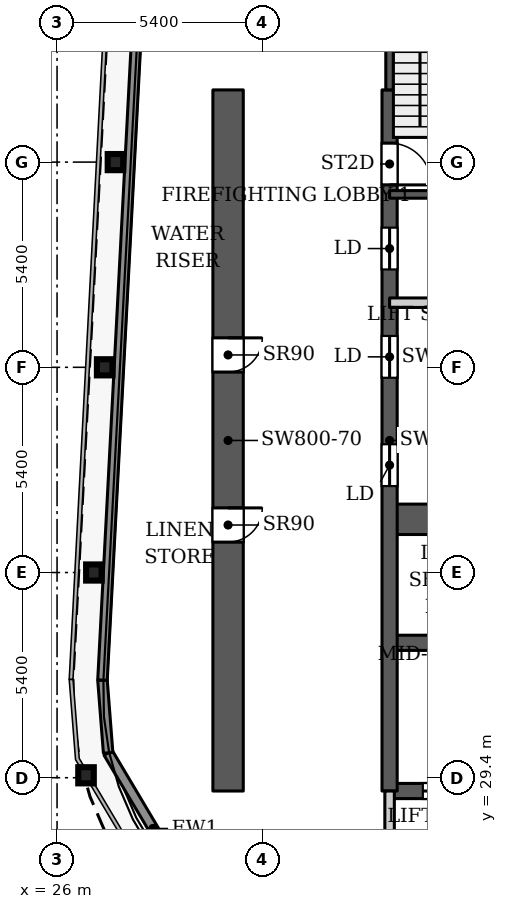
"""IFC4 building model, lengths in metres.
Left out: names, types, materials, properties, quantities, classifications, styles, units other than length and angle.
Written with IfcOpenShell. Run it as: python <this file> out.ifc"""

import sys

from ifc_helpers import new_model, si_unit, direction, frame, frame_2d, origin, origin_2d, place, context, subcontext, project, spatial, rectangle, i_section, extrude, source, transform, mapped, element, fill, save


model = new_model("IFC4")
c1 = context("Model", 3, precision=1e-05, world=origin(), true_north=direction((0.0, 1.0)))
c2 = subcontext(c1, "Body", "Model", "MODEL_VIEW")
j1 = project(units=[si_unit("LENGTHUNIT", "METRE"), si_unit("PLANEANGLEUNIT", "RADIAN")], contexts=[c1])
p1 = place(None, origin())
s1 = spatial("IfcSite", under=j1, at=p1, CompositionType="ELEMENT")
p2 = place(p1, origin())
s2 = spatial("IfcBuilding", under=s1, at=p2, CompositionType="ELEMENT")
p3 = place(p2, frame((0.0, 0.0, 156.5)))
s3 = spatial("IfcBuildingStorey", under=s2, at=p3, CompositionType="ELEMENT", Elevation=156.5)
for number, where, z_axis, x_axis in (
    (1, (26.762, 29.464, 0.0), (0.0, 0.0, 1.0), (1.0, 0.0, 0.0)),
    (2, (26.969, 34.8, 0.0), (0.0, 0.0, 1.0), (1.0, 0.0, 0.0)),
    (3, (27.253, 40.2, 0.0), (0.0, 0.0, 1.0), (1.0, 0.0, 0.0)),
    (4, (27.537, 45.6, 0.0), (0.0, 0.0, 1.0), (1.0, 0.0, 0.0)),
):
    element("IfcColumn", number, at=place(p3, frame(where, z_axis=z_axis, x_axis=x_axis)), inside=s3, PredefinedType="COLUMN", context=c2, shape_type="SweptSolid", body=[
        extrude(i_section(OverallWidth=0.409, OverallDepth=0.425, WebThickness=0.033, FlangeThickness=0.052, FilletRadius=0.013, at=origin_2d()), origin(), (0.0, 0.0, 1.0), 3.9),
    ])
p4 = place(p3, frame((34.75, 29.05, 0.0), z_axis=(0.0, 0.0, 1.0), x_axis=(1.0, 0.0, 0.0)))
e5 = element("IfcWall", 5, at=p4, inside=s3, PredefinedType="SHEAR", context=c2, shape_type="SweptSolid", body=[
    extrude(rectangle(XDim=18.4, YDim=0.4, at=frame_2d((9.2, 0.0))), origin(), (0.0, 0.0, 1.0), 3.9),
])
p5 = place(p4, frame((0.875, 0.0, 0.0)))
e6 = element("IfcOpeningElement", 6, at=p5, cuts=e5, PredefinedType="OPENING", context=c2, shape_type="SweptSolid", body=[
    extrude(rectangle(XDim=1.1, YDim=2.2, at=frame_2d((0.55, 1.1))), frame((0.0, 0.21, 0.0), z_axis=(0.0, -1.0, 0.0), x_axis=(1.0, 0.0, 0.0)), (0.0, 0.0, 1.0), 0.42),
])
p6 = place(p4, frame((3.725, 0.0, 0.0)))
e7 = element("IfcOpeningElement", 7, at=p6, cuts=e5, PredefinedType="OPENING", context=c2, shape_type="SweptSolid", body=[
    extrude(rectangle(XDim=1.1, YDim=2.2, at=frame_2d((0.55, 1.1))), frame((0.0, 0.21, 0.0), z_axis=(0.0, -1.0, 0.0), x_axis=(1.0, 0.0, 0.0)), (0.0, 0.0, 1.0), 0.42),
])
p7 = place(p4, frame((6.575, 0.0, 0.0)))
e8 = element("IfcOpeningElement", 8, at=p7, cuts=e5, PredefinedType="OPENING", context=c2, shape_type="SweptSolid", body=[
    extrude(rectangle(XDim=1.1, YDim=2.2, at=frame_2d((0.55, 1.1))), frame((0.0, 0.21, 0.0), z_axis=(0.0, -1.0, 0.0), x_axis=(1.0, 0.0, 0.0)), (0.0, 0.0, 1.0), 0.42),
])
p8 = place(p4, frame((9.425, 0.0, 0.0)))
e9 = element("IfcOpeningElement", 9, at=p8, cuts=e5, PredefinedType="OPENING", context=c2, shape_type="SweptSolid", body=[
    extrude(rectangle(XDim=1.1, YDim=2.2, at=frame_2d((0.55, 1.1))), frame((0.0, 0.21, 0.0), z_axis=(0.0, -1.0, 0.0), x_axis=(1.0, 0.0, 0.0)), (0.0, 0.0, 1.0), 0.42),
])
p9 = place(p4, frame((12.275, 0.0, 0.0)))
e10 = element("IfcOpeningElement", 10, at=p9, cuts=e5, PredefinedType="OPENING", context=c2, shape_type="SweptSolid", body=[
    extrude(rectangle(XDim=1.1, YDim=2.2, at=frame_2d((0.55, 1.1))), frame((0.0, 0.21, 0.0), z_axis=(0.0, -1.0, 0.0), x_axis=(1.0, 0.0, 0.0)), (0.0, 0.0, 1.0), 0.42),
])
p10 = place(p4, frame((15.125, 0.0, 0.0)))
e11 = element("IfcOpeningElement", 11, at=p10, cuts=e5, PredefinedType="OPENING", context=c2, shape_type="SweptSolid", body=[
    extrude(rectangle(XDim=1.1, YDim=2.2, at=frame_2d((0.55, 1.1))), frame((0.0, 0.21, 0.0), z_axis=(0.0, -1.0, 0.0), x_axis=(1.0, 0.0, 0.0)), (0.0, 0.0, 1.0), 0.42),
])
p11 = place(p3, frame((34.75, 32.95, 0.0), z_axis=(0.0, 0.0, 1.0), x_axis=(1.0, 0.0, 0.0)))
e12 = element("IfcWall", 12, at=p11, inside=s3, PredefinedType="SHEAR", context=c2, shape_type="SweptSolid", body=[
    extrude(rectangle(XDim=14.25, YDim=0.4, at=frame_2d((7.125, 0.0))), origin(), (0.0, 0.0, 1.0), 3.9),
])
p12 = place(p3, frame((34.75, 36.2, 0.0), z_axis=(0.0, 0.0, 1.0), x_axis=(1.0, 0.0, 0.0)))
e13 = element("IfcWall", 13, at=p12, inside=s3, PredefinedType="SHEAR", context=c2, shape_type="SweptSolid", body=[
    extrude(rectangle(XDim=18.4, YDim=0.8, at=frame_2d((9.2, 0.0))), origin(), (0.0, 0.0, 1.0), 3.9),
])
p13 = place(p12, frame((16.9, 0.0, 0.0)))
e14 = element("IfcOpeningElement", 14, at=p13, cuts=e13, PredefinedType="OPENING", context=c2, shape_type="SweptSolid", body=[
    extrude(rectangle(XDim=1.0, YDim=2.2, at=frame_2d((0.5, 1.1))), frame((0.0, 0.41, 0.0), z_axis=(0.0, -1.0, 0.0), x_axis=(1.0, 0.0, 0.0)), (0.0, 0.0, 1.0), 0.82),
])
p14 = place(p3, frame((34.75, 29.05, 0.0), z_axis=(0.0, 0.0, 1.0), x_axis=(0.0, 1.0, 0.0)))
e15 = element("IfcWall", 15, at=p14, inside=s3, PredefinedType="SHEAR", context=c2, shape_type="SweptSolid", body=[
    extrude(rectangle(XDim=18.45, YDim=0.4, at=frame_2d((9.225, 0.0))), origin(), (0.0, 0.0, 1.0), 3.9),
])
p15 = place(p14, frame((8.025, 0.0, 0.0)))
e16 = element("IfcOpeningElement", 16, at=p15, cuts=e15, PredefinedType="OPENING", context=c2, shape_type="SweptSolid", body=[
    extrude(rectangle(XDim=1.1, YDim=2.2, at=frame_2d((0.55, 1.1))), frame((0.0, 0.21, 0.0), z_axis=(0.0, -1.0, 0.0), x_axis=(1.0, 0.0, 0.0)), (0.0, 0.0, 1.0), 0.42),
])
p16 = place(p14, frame((10.875, 0.0, 0.0)))
e17 = element("IfcOpeningElement", 17, at=p16, cuts=e15, PredefinedType="OPENING", context=c2, shape_type="SweptSolid", body=[
    extrude(rectangle(XDim=1.1, YDim=2.2, at=frame_2d((0.55, 1.1))), frame((0.0, 0.21, 0.0), z_axis=(0.0, -1.0, 0.0), x_axis=(1.0, 0.0, 0.0)), (0.0, 0.0, 1.0), 0.42),
])
p17 = place(p14, frame((13.725, 0.0, 0.0)))
e18 = element("IfcOpeningElement", 18, at=p17, cuts=e15, PredefinedType="OPENING", context=c2, shape_type="SweptSolid", body=[
    extrude(rectangle(XDim=1.1, YDim=2.2, at=frame_2d((0.55, 1.1))), frame((0.0, 0.21, 0.0), z_axis=(0.0, -1.0, 0.0), x_axis=(1.0, 0.0, 0.0)), (0.0, 0.0, 1.0), 0.42),
])
p18 = place(p14, frame((15.95, 0.0, 0.0)))
e19 = element("IfcOpeningElement", 19, at=p18, cuts=e15, PredefinedType="OPENING", context=c2, shape_type="SweptSolid", body=[
    extrude(rectangle(XDim=1.1, YDim=2.2, at=frame_2d((0.55, 1.1))), frame((0.0, 0.21, 0.0), z_axis=(0.0, -1.0, 0.0), x_axis=(1.0, 0.0, 0.0)), (0.0, 0.0, 1.0), 0.42),
])
p19 = place(p3, frame((30.5, 29.05, 0.0), z_axis=(0.0, 0.0, 1.0), x_axis=(0.0, 1.0, 0.0)))
e20 = element("IfcWall", 20, at=p19, inside=s3, PredefinedType="SHEAR", context=c2, shape_type="SweptSolid", body=[
    extrude(rectangle(XDim=18.45, YDim=0.8, at=frame_2d((9.225, 0.0))), origin(), (0.0, 0.0, 1.0), 3.9),
])
p20 = place(p19, frame((6.55, 0.0, 0.0)))
e21 = element("IfcOpeningElement", 21, at=p20, cuts=e20, PredefinedType="OPENING", context=c2, shape_type="SweptSolid", body=[
    extrude(rectangle(XDim=0.9, YDim=2.2, at=frame_2d((0.45, 1.1))), frame((0.0, 0.41, 0.0), z_axis=(0.0, -1.0, 0.0), x_axis=(1.0, 0.0, 0.0)), (0.0, 0.0, 1.0), 0.82),
])
p21 = place(p19, frame((11.025, 0.0, 0.0)))
e22 = element("IfcOpeningElement", 22, at=p21, cuts=e20, PredefinedType="OPENING", context=c2, shape_type="SweptSolid", body=[
    extrude(rectangle(XDim=0.9, YDim=2.2, at=frame_2d((0.45, 1.1))), frame((0.0, 0.41, 0.0), z_axis=(0.0, -1.0, 0.0), x_axis=(1.0, 0.0, 0.0)), (0.0, 0.0, 1.0), 0.82),
])
p22 = place(p3, frame((29.712, 26.072, 0.0), z_axis=(0.0, 0.0, 1.0), x_axis=(-0.511028049012, 0.859564036662, 0.0)))
e23 = element("IfcWall", 23, at=p22, inside=s3, PredefinedType="SOLIDWALL", context=c2, shape_type="SweptSolid", body=[
    extrude(rectangle(XDim=4.634, YDim=0.25, at=frame_2d((2.317, 0.0))), origin(), (0.0, 0.0, 1.0), 3.147),
])
p23 = place(p3, frame((27.344, 30.055, 0.0), z_axis=(0.0, 0.0, 1.0), x_axis=(-0.077571675317, 0.99698677784, 0.0)))
e24 = element("IfcWall", 24, at=p23, inside=s3, PredefinedType="SOLIDWALL", context=c2, shape_type="SweptSolid", body=[
    extrude(rectangle(XDim=1.92, YDim=0.25, at=frame_2d((0.96, 0.0))), origin(), (0.0, 0.0, 1.0), 3.75),
])
p24 = place(p3, frame((27.195, 31.969, 0.0), z_axis=(0.0, 0.0, 1.0), x_axis=(0.052554995867, 0.998618031286, 0.0)))
e25 = element("IfcWall", 25, at=p24, inside=s3, PredefinedType="SOLIDWALL", context=c2, shape_type="SweptSolid", body=[
    extrude(rectangle(XDim=66.787, YDim=0.25, at=frame_2d((33.394, 0.0))), origin(), (0.0, 0.0, 1.0), 3.75),
])
p25 = place(p3, frame((34.75, 44.75, 0.0), z_axis=(0.0, 0.0, 1.0), x_axis=(1.0, 0.0, 0.0)))
e26 = element("IfcWall", 26, at=p25, inside=s3, PredefinedType="SHEAR", context=c2, shape_type="SweptSolid", body=[
    extrude(rectangle(XDim=3.15, YDim=0.2, at=frame_2d((1.575, 0.0))), origin(), (0.0, 0.0, 1.0), 3.9),
])
p26 = place(p3, frame((34.75, 47.5, 0.0), z_axis=(0.0, 0.0, 1.0), x_axis=(0.0, 1.0, 0.0)))
e27 = element("IfcWall", 27, at=p26, inside=s3, PredefinedType="SHEAR", context=c2, shape_type="SweptSolid", body=[
    extrude(rectangle(XDim=6.41, YDim=0.2, at=frame_2d((3.205, 0.0))), origin(), (0.0, 0.0, 1.0), 3.9),
])
for number, where, z_axis, x_axis in (
    (28, (34.75, 25.8, 0.0), (0.0, 0.0, 1.0), (0.0, 1.0, 0.0)),
    (29, (34.75, 41.9, 0.0), (0.0, 0.0, 1.0), (1.0, 0.0, 0.0)),
):
    element("IfcWall", number, at=place(p3, frame(where, z_axis=z_axis, x_axis=x_axis)), inside=s3, PredefinedType="PARTITIONING", context=c2, shape_type="SweptSolid", body=[
        extrude(rectangle(XDim=3.25, YDim=0.25, at=frame_2d((1.625, 0.0))), origin(), (0.0, 0.0, 1.0), 3.9),
    ])
m1 = source(origin(), c2, "Body", "SweptSolid", [
    extrude(rectangle(XDim=1.1, YDim=2.2, at=frame_2d((0.55, 1.1))), frame((0.0, 0.025, 0.0), z_axis=(0.0, -1.0, 0.0), x_axis=(1.0, 0.0, 0.0)), (0.0, 0.0, 1.0), 0.05),
])
p27 = place(p5, origin())
e30 = element("IfcDoor", 30, at=p27, inside=s3, OperationType="SLIDING_TO_LEFT", PredefinedType="DOOR", context=c2, shape_type="MappedRepresentation", body=[
    mapped(m1, transform((0.0, 0.0, 0.0), x_axis=(1.0, 0.0, 0.0), y_axis=(0.0, 1.0, 0.0), z_axis=(0.0, 0.0, 1.0), scale=1.0)),
])
fill(e6, e30)
p28 = place(p15, origin())
e31 = element("IfcDoor", 31, at=p28, inside=s3, OperationType="SLIDING_TO_LEFT", PredefinedType="DOOR", context=c2, shape_type="MappedRepresentation", body=[
    mapped(m1, transform((0.0, 0.0, 0.0), x_axis=(1.0, 0.0, 0.0), y_axis=(0.0, 1.0, 0.0), z_axis=(0.0, 0.0, 1.0), scale=1.0)),
])
fill(e16, e31)
p29 = place(p16, origin())
e32 = element("IfcDoor", 32, at=p29, inside=s3, OperationType="SLIDING_TO_LEFT", PredefinedType="DOOR", context=c2, shape_type="MappedRepresentation", body=[
    mapped(m1, transform((0.0, 0.0, 0.0), x_axis=(1.0, 0.0, 0.0), y_axis=(0.0, 1.0, 0.0), z_axis=(0.0, 0.0, 1.0), scale=1.0)),
])
fill(e17, e32)
p30 = place(p17, origin())
e33 = element("IfcDoor", 33, at=p30, inside=s3, OperationType="SLIDING_TO_LEFT", PredefinedType="DOOR", context=c2, shape_type="MappedRepresentation", body=[
    mapped(m1, transform((0.0, 0.0, 0.0), x_axis=(1.0, 0.0, 0.0), y_axis=(0.0, 1.0, 0.0), z_axis=(0.0, 0.0, 1.0), scale=1.0)),
])
fill(e18, e33)
m2 = source(origin(), c2, "Body", "SweptSolid", [
    extrude(rectangle(XDim=0.9, YDim=2.2, at=frame_2d((0.45, 1.1))), frame((0.0, 0.025, 0.0), z_axis=(0.0, -1.0, 0.0), x_axis=(1.0, 0.0, 0.0)), (0.0, 0.0, 1.0), 0.05),
])
p31 = place(p20, origin())
e34 = element("IfcDoor", 34, at=p31, inside=s3, OperationType="SINGLE_SWING_RIGHT", PredefinedType="DOOR", context=c2, shape_type="MappedRepresentation", body=[
    mapped(m2, transform((0.0, 0.0, 0.0), x_axis=(1.0, 0.0, 0.0), y_axis=(0.0, 1.0, 0.0), z_axis=(0.0, 0.0, 1.0), scale=1.0)),
])
fill(e21, e34)
p32 = place(p21, origin())
e35 = element("IfcDoor", 35, at=p32, inside=s3, OperationType="SINGLE_SWING_RIGHT", PredefinedType="DOOR", context=c2, shape_type="MappedRepresentation", body=[
    mapped(m2, transform((0.0, 0.0, 0.0), x_axis=(1.0, 0.0, 0.0), y_axis=(0.0, 1.0, 0.0), z_axis=(0.0, 0.0, 1.0), scale=1.0)),
])
fill(e22, e35)
m3 = source(origin(), c2, "Body", "SweptSolid", [
    extrude(rectangle(XDim=1.1, YDim=2.2, at=frame_2d((0.55, 1.1))), frame((0.0, 0.025, 0.0), z_axis=(0.0, -1.0, 0.0), x_axis=(1.0, 0.0, 0.0)), (0.0, 0.0, 1.0), 0.05),
])
p33 = place(p18, origin())
e36 = element("IfcDoor", 36, at=p33, inside=s3, OperationType="SINGLE_SWING_RIGHT", PredefinedType="DOOR", context=c2, shape_type="MappedRepresentation", body=[
    mapped(m3, transform((0.0, 0.0, 0.0), x_axis=(1.0, 0.0, 0.0), y_axis=(0.0, 1.0, 0.0), z_axis=(0.0, 0.0, 1.0), scale=1.0)),
])
fill(e19, e36)
save(model, sys.argv[1])
